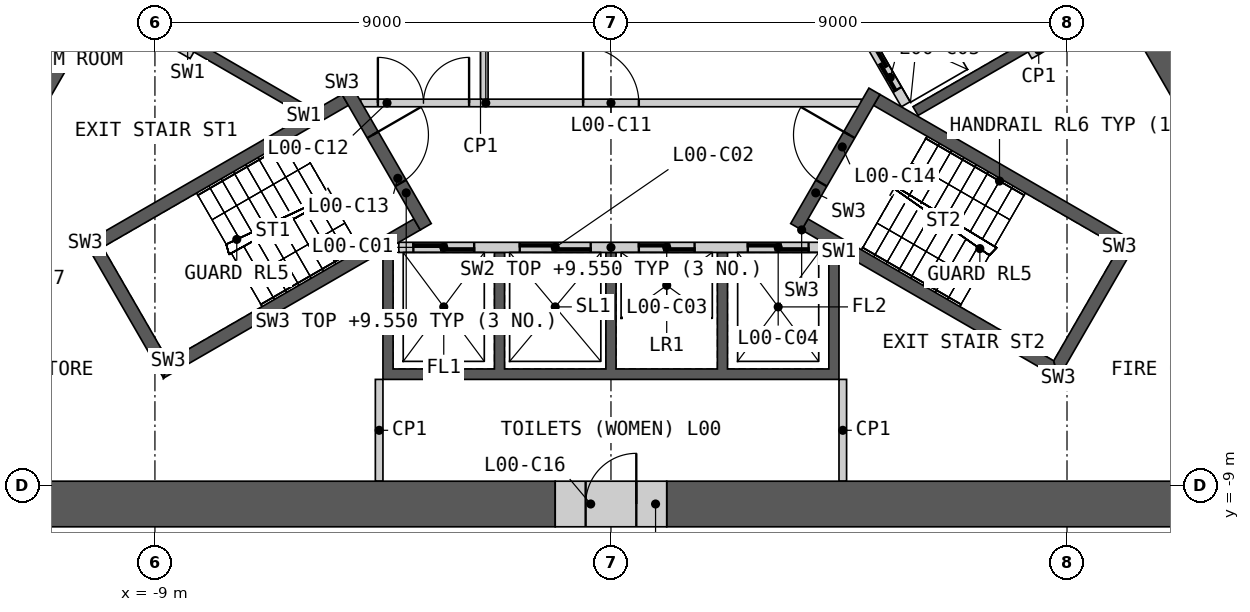
"""IFC4 building model, lengths in metres.
Left out: names, types, materials, properties, quantities, classifications, styles, units other than length and angle.
Written with IfcOpenShell. Run it as: python <this file> out.ifc"""

import sys

from ifc_helpers import new_model, si_unit, direction, frame, frame_2d, origin, place, context, subcontext, project, spatial, polyline, rectangle, outline, extrude, element, fill, save


model = new_model("IFC4")
c1 = context("Model", 3, precision=1e-05, world=origin(), true_north=direction((0.0, 1.0)))
c2 = subcontext(c1, "Body", "Model", "MODEL_VIEW")
j1 = project(units=[si_unit("LENGTHUNIT", "METRE"), si_unit("PLANEANGLEUNIT", "RADIAN")], contexts=[c1])
p1 = place(None, origin())
s1 = spatial("IfcSite", under=j1, at=p1, CompositionType="ELEMENT")
p2 = place(p1, origin())
s2 = spatial("IfcBuilding", under=s1, at=p2, CompositionType="ELEMENT")
p3 = place(p2, origin())
s3 = spatial("IfcBuildingStorey", under=s2, at=p3, CompositionType="ELEMENT", Elevation=0.0)
p4 = place(p3, origin())
e1 = element("IfcWall", 1, at=p4, inside=s3, PredefinedType="SHEAR", context=c2, shape_type="SweptSolid", body=[
    extrude(outline(polyline([(4.5, -4.4), (4.5, -6.906), (-4.5, -6.906), (-4.5, -4.4), (-4.3, -4.4), (-4.3, -6.7), (-2.3, -6.7), (-2.3, -4.4), (-2.1, -4.4), (-2.1, -6.7), (-0.1, -6.7), (-0.1, -4.4), (0.1, -4.4), (0.1, -6.7), (2.1, -6.7), (2.1, -4.4), (2.3, -4.4), (2.3, -6.7), (4.3, -6.7), (4.3, -4.4), (4.5, -4.4)])), origin(), (0.0, 0.0, 1.0), 9.55),
])
p5 = place(p3, frame((-4.187, -4.3, 0.0), z_axis=(0.0, 0.0, 1.0), x_axis=(1.0, 0.0, 0.0)))
e2 = element("IfcWall", 2, at=p5, inside=s3, PredefinedType="SOLIDWALL", context=c2, shape_type="SweptSolid", body=[
    extrude(rectangle(XDim=8.373, YDim=0.2, at=frame_2d((4.187, 0.0))), origin(), (0.0, 0.0, 1.0), 9.55),
])
p6 = place(p5, frame((0.287, 0.0, 0.0)))
e3 = element("IfcOpeningElement", 3, at=p6, cuts=e2, PredefinedType="OPENING", context=c2, shape_type="SweptSolid", body=[
    extrude(rectangle(XDim=1.2, YDim=2.1, at=frame_2d((0.6, 1.05))), frame((0.0, 0.11, 0.0), z_axis=(0.0, -1.0, 0.0), x_axis=(1.0, 0.0, 0.0)), (0.0, 0.0, 1.0), 0.22),
])
p7 = place(p5, frame((2.387, 0.0, 0.0)))
e4 = element("IfcOpeningElement", 4, at=p7, cuts=e2, PredefinedType="OPENING", context=c2, shape_type="SweptSolid", body=[
    extrude(rectangle(XDim=1.4, YDim=2.1, at=frame_2d((0.7, 1.05))), frame((0.0, 0.11, 0.0), z_axis=(0.0, -1.0, 0.0), x_axis=(1.0, 0.0, 0.0)), (0.0, 0.0, 1.0), 0.22),
])
p8 = place(p5, frame((4.737, 0.0, 0.0)))
e5 = element("IfcOpeningElement", 5, at=p8, cuts=e2, PredefinedType="OPENING", context=c2, shape_type="SweptSolid", body=[
    extrude(rectangle(XDim=1.1, YDim=2.1, at=frame_2d((0.55, 1.05))), frame((0.0, 0.11, 0.0), z_axis=(0.0, -1.0, 0.0), x_axis=(1.0, 0.0, 0.0)), (0.0, 0.0, 1.0), 0.22),
])
p9 = place(p5, frame((6.887, 0.0, 0.0)))
e6 = element("IfcOpeningElement", 6, at=p9, cuts=e2, PredefinedType="OPENING", context=c2, shape_type="SweptSolid", body=[
    extrude(rectangle(XDim=1.2, YDim=2.1, at=frame_2d((0.6, 1.05))), frame((0.0, 0.11, 0.0), z_axis=(0.0, -1.0, 0.0), x_axis=(1.0, 0.0, 0.0)), (0.0, 0.0, 1.0), 0.22),
])
p10 = place(p3, origin())
e7 = element("IfcWall", 7, at=p10, inside=s3, PredefinedType="SHEAR", context=c2, shape_type="SweptSolid", body=[
    extrude(outline(polyline([(2.66, 4.192), (4.831, 5.445), (8.231, -0.444), (6.061, -1.697), (5.96, -1.524), (7.952, -0.374), (6.952, 1.358), (4.96, 0.208), (4.861, 0.381), (6.852, 1.531), (5.852, 3.263), (3.861, 2.113), (3.76, 2.287), (5.752, 3.437), (4.752, 5.169), (2.76, 4.019), (2.66, 4.192)])), origin(), (0.0, 0.0, 1.0), 9.55),
])
p11 = place(p3, frame((5.817, -1.476, 0.0), z_axis=(0.0, 0.0, 1.0), x_axis=(-0.499992876559, 0.866029516466, 0.0)))
e8 = element("IfcWall", 8, at=p11, inside=s3, PredefinedType="SOLIDWALL", context=c2, shape_type="SweptSolid", body=[
    extrude(rectangle(XDim=6.486, YDim=0.2, at=frame_2d((3.243, 0.0))), origin(), (0.0, 0.0, 1.0), 9.55),
])
p12 = place(p11, frame((0.337, 0.0, 0.0)))
e9 = element("IfcOpeningElement", 9, at=p12, cuts=e8, PredefinedType="OPENING", context=c2, shape_type="SweptSolid", body=[
    extrude(rectangle(XDim=1.1, YDim=2.1, at=frame_2d((0.55, 1.05))), frame((0.0, 0.11, 0.0), z_axis=(0.0, -1.0, 0.0), x_axis=(1.0, 0.0, 0.0)), (0.0, 0.0, 1.0), 0.22),
])
p13 = place(p11, frame((2.537, 0.0, 0.0)))
e10 = element("IfcOpeningElement", 10, at=p13, cuts=e8, PredefinedType="OPENING", context=c2, shape_type="SweptSolid", body=[
    extrude(rectangle(XDim=1.1, YDim=2.1, at=frame_2d((0.55, 1.05))), frame((0.0, 0.11, 0.0), z_axis=(0.0, -1.0, 0.0), x_axis=(1.0, 0.0, 0.0)), (0.0, 0.0, 1.0), 0.22),
])
p14 = place(p11, frame((4.737, 0.0, 0.0)))
e11 = element("IfcOpeningElement", 11, at=p14, cuts=e8, PredefinedType="OPENING", context=c2, shape_type="SweptSolid", body=[
    extrude(rectangle(XDim=1.1, YDim=2.1, at=frame_2d((0.55, 1.05))), frame((0.0, 0.11, 0.0), z_axis=(0.0, -1.0, 0.0), x_axis=(1.0, 0.0, 0.0)), (0.0, 0.0, 1.0), 0.22),
])
p15 = place(p3, origin())
e12 = element("IfcWall", 12, at=p15, inside=s3, PredefinedType="SHEAR", context=c2, shape_type="SweptSolid", body=[
    extrude(outline(polyline([(-6.061, -1.697), (-8.231, -0.444), (-8.131, -0.271), (-5.96, -1.524), (-6.061, -1.697)])), origin(), (0.0, 0.0, 1.0), 9.55),
])
p16 = place(p3, frame((-4.941, -1.45, 0.0), z_axis=(0.0, 0.0, 1.0), x_axis=(1.0, 0.0, 0.0)))
e13 = element("IfcWall", 13, at=p16, inside=s3, PredefinedType="PARTITIONING", context=c2, shape_type="SweptSolid", body=[
    extrude(rectangle(XDim=9.882, YDim=0.15, at=frame_2d((4.941, 0.0))), origin(), (0.0, 0.0, 1.0), 9.55),
])
p17 = place(p16, frame((4.391, 0.0, 0.0)))
e14 = element("IfcOpeningElement", 14, at=p17, cuts=e13, PredefinedType="OPENING", context=c2, shape_type="SweptSolid", body=[
    extrude(rectangle(XDim=1.1, YDim=2.1, at=frame_2d((0.55, 1.05))), frame((0.0, 0.085, 0.0), z_axis=(0.0, -1.0, 0.0), x_axis=(1.0, 0.0, 0.0)), (0.0, 0.0, 1.0), 0.17),
])
p18 = place(p16, frame((0.341, 0.0, 0.0)))
e15 = element("IfcOpeningElement", 15, at=p18, cuts=e13, PredefinedType="OPENING", context=c2, shape_type="SweptSolid", body=[
    extrude(rectangle(XDim=1.8, YDim=2.1, at=frame_2d((0.9, 1.05))), frame((0.0, 0.085, 0.0), z_axis=(0.0, -1.0, 0.0), x_axis=(1.0, 0.0, 0.0)), (0.0, 0.0, 1.0), 0.17),
])
p19 = place(p3, origin())
e16 = element("IfcWall", 16, at=p19, inside=s3, PredefinedType="PARTITIONING", context=c2, shape_type="SweptSolid", body=[
    extrude(outline(polyline([(-2.575, 0.235), (-2.425, 0.235), (-2.425, -1.375), (-2.575, -1.375), (-2.575, 0.235)])), origin(), (0.0, 0.0, 1.0), 9.55),
])
p20 = place(p3, origin())
e17 = element("IfcWall", 17, at=p20, inside=s3, PredefinedType="SHEAR", context=c2, shape_type="SweptSolid", body=[
    extrude(outline(polyline([(-5.307, -1.281), (-10.374, -4.206), (-10.032, -4.298), (-5.182, -1.498), (-5.307, -1.281)])), origin(), (0.0, 0.0, 1.0), 9.55),
])
p21 = place(p3, origin())
e18 = element("IfcWall", 18, at=p21, inside=s3, PredefinedType="SHEAR", context=c2, shape_type="SweptSolid", body=[
    extrude(outline(polyline([(-10.374, -4.206), (-8.83, -6.881), (-8.738, -6.539), (-10.032, -4.298), (-10.374, -4.206)])), origin(), (0.0, 0.0, 1.0), 9.55),
])
p22 = place(p3, origin())
e19 = element("IfcWall", 19, at=p22, inside=s3, PredefinedType="SHEAR", context=c2, shape_type="SweptSolid", body=[
    extrude(outline(polyline([(-8.738, -6.539), (-8.83, -6.881), (-3.763, -3.956), (-3.888, -3.739), (-8.738, -6.539)])), origin(), (0.0, 0.0, 1.0), 9.55),
])
p23 = place(p3, frame((-5.199, -1.219, 0.0), z_axis=(0.0, 0.0, 1.0), x_axis=(0.499982516597, -0.866035497597, 0.0)))
e20 = element("IfcWall", 20, at=p23, inside=s3, PredefinedType="SHEAR", context=c2, shape_type="SweptSolid", body=[
    extrude(rectangle(XDim=3.088, YDim=0.25, at=frame_2d((1.544, 0.0))), origin(), (0.0, 0.0, 1.0), 9.55),
])
p24 = place(p23, frame((0.994, 0.0, 0.0)))
e21 = element("IfcOpeningElement", 21, at=p24, cuts=e20, PredefinedType="OPENING", context=c2, shape_type="SweptSolid", body=[
    extrude(rectangle(XDim=1.1, YDim=2.1, at=frame_2d((0.55, 1.05))), frame((0.0, 0.135, 0.0), z_axis=(0.0, -1.0, 0.0), x_axis=(1.0, 0.0, 0.0)), (0.0, 0.0, 1.0), 0.27),
])
p25 = place(p3, origin())
e22 = element("IfcWall", 22, at=p25, inside=s3, PredefinedType="SHEAR", context=c2, shape_type="SweptSolid", body=[
    extrude(outline(polyline([(3.763, -3.956), (8.83, -6.881), (8.738, -6.539), (3.888, -3.739), (3.763, -3.956)])), origin(), (0.0, 0.0, 1.0), 9.55),
])
p26 = place(p3, origin())
e23 = element("IfcWall", 23, at=p26, inside=s3, PredefinedType="SHEAR", context=c2, shape_type="SweptSolid", body=[
    extrude(outline(polyline([(8.83, -6.881), (10.374, -4.206), (10.032, -4.298), (8.738, -6.539), (8.83, -6.881)])), origin(), (0.0, 0.0, 1.0), 9.55),
])
p27 = place(p3, origin())
e24 = element("IfcWall", 24, at=p27, inside=s3, PredefinedType="SHEAR", context=c2, shape_type="SweptSolid", body=[
    extrude(outline(polyline([(10.032, -4.298), (10.374, -4.206), (5.307, -1.281), (5.182, -1.498), (10.032, -4.298)])), origin(), (0.0, 0.0, 1.0), 9.55),
])
p28 = place(p3, frame((3.655, -3.893, 0.0), z_axis=(0.0, 0.0, 1.0), x_axis=(0.499982516597, 0.866035497597, 0.0)))
e25 = element("IfcWall", 25, at=p28, inside=s3, PredefinedType="SHEAR", context=c2, shape_type="SweptSolid", body=[
    extrude(rectangle(XDim=3.088, YDim=0.25, at=frame_2d((1.544, 0.0))), origin(), (0.0, 0.0, 1.0), 9.55),
])
p29 = place(p28, frame((0.994, 0.0, 0.0)))
e26 = element("IfcOpeningElement", 26, at=p29, cuts=e25, PredefinedType="OPENING", context=c2, shape_type="SweptSolid", body=[
    extrude(rectangle(XDim=1.1, YDim=2.1, at=frame_2d((0.55, 1.05))), frame((0.0, 0.135, 0.0), z_axis=(0.0, -1.0, 0.0), x_axis=(1.0, 0.0, 0.0)), (0.0, 0.0, 1.0), 0.27),
])
for number, where, z_axis, x_axis in (
    (27, (4.575, -6.906, 0.0), (0.0, 0.0, 1.0), (0.0, -1.0, 0.0)),
    (28, (-4.575, -6.906, 0.0), (0.0, 0.0, 1.0), (0.0, -1.0, 0.0)),
):
    element("IfcWall", number, at=place(p3, frame(where, z_axis=z_axis, x_axis=x_axis)), inside=s3, PredefinedType="PARTITIONING", context=c2, shape_type="SweptSolid", body=[
        extrude(rectangle(XDim=2.009, YDim=0.15, at=frame_2d((1.004, 0.0))), origin(), (0.0, 0.0, 1.0), 9.55),
    ])
for number, where, z_axis, x_axis in (
    (29, (8.268, -0.509, 0.0), (0.0, 0.0, 1.0), (0.866, 0.5, 0.0)),
    (30, (-8.268, -0.509, 0.0), (0.0, 0.0, 1.0), (-0.866, 0.5, 0.0)),
):
    element("IfcWall", number, at=place(p3, frame(where, z_axis=z_axis, x_axis=x_axis)), inside=s3, PredefinedType="PARTITIONING", context=c2, shape_type="SweptSolid", body=[
        extrude(rectangle(XDim=2.009, YDim=0.15, at=frame_2d((1.004, 0.0))), origin(), (0.0, 0.0, 1.0), 9.55),
    ])
for number, where, z_axis, x_axis in (
    (31, (1.1, -9.365, 0.0), (0.0, 0.0, 1.0), (1.0, 0.0, 0.0)),
    (32, (-15.441, -9.365, 0.0), (0.0, 0.0, 1.0), (1.0, 0.0, 0.0)),
):
    element("IfcWall", number, at=place(p3, frame(where, z_axis=z_axis, x_axis=x_axis)), inside=s3, PredefinedType="SHEAR", context=c2, shape_type="SweptSolid", body=[
        extrude(rectangle(XDim=14.341, YDim=0.9, at=frame_2d((7.17, 0.0))), origin(), (0.0, 0.0, 1.0), 9.55),
    ])
p30 = place(p3, frame((12.583, -3.065, 0.0), z_axis=(0.0, 0.0, 1.0), x_axis=(-0.49998745675, 0.866032645512, 0.0)))
e33 = element("IfcWall", 33, at=p30, inside=s3, PredefinedType="SHEAR", context=c2, shape_type="SweptSolid", body=[
    extrude(rectangle(XDim=6.646, YDim=0.9, at=frame_2d((3.323, 0.0))), origin(), (0.0, 0.0, 1.0), 9.55),
])
p31 = place(p3, frame((-10.26, 0.958, 0.0), z_axis=(0.0, 0.0, 1.0), x_axis=(-0.499993887256, -0.86602893295, 0.0)))
e34 = element("IfcWall", 34, at=p31, inside=s3, PredefinedType="SHEAR", context=c2, shape_type="SweptSolid", body=[
    extrude(rectangle(XDim=4.646, YDim=0.9, at=frame_2d((2.323, 0.0))), origin(), (0.0, 0.0, 1.0), 9.55),
])
p32 = place(p3, frame((-1.1, -9.365, 0.0), z_axis=(0.0, 0.0, 1.0), x_axis=(1.0, 0.0, 0.0)))
e35 = element("IfcWall", 35, at=p32, inside=s3, PredefinedType="SHEAR", context=c2, shape_type="SweptSolid", body=[
    extrude(rectangle(XDim=2.2, YDim=0.9, at=frame_2d((1.1, 0.0))), origin(), (0.0, 0.0, 1.0), 9.55),
])
p33 = place(p32, frame((0.6, 0.0, 0.0)))
e36 = element("IfcOpeningElement", 36, at=p33, cuts=e35, PredefinedType="OPENING", context=c2, shape_type="SweptSolid", body=[
    extrude(rectangle(XDim=1.0, YDim=2.1, at=frame_2d((0.5, 1.05))), frame((0.0, 0.46, 0.0), z_axis=(0.0, -1.0, 0.0), x_axis=(1.0, 0.0, 0.0)), (0.0, 0.0, 1.0), 0.92),
])
p34 = place(p3, frame((10.749, 5.813, 0.0), z_axis=(0.0, 0.0, 1.0), x_axis=(0.500004292778, -0.866022925334, 0.0)))
e37 = element("IfcWall", 37, at=p34, inside=s3, PredefinedType="PARTITIONING", context=c2, shape_type="SweptSolid", body=[
    extrude(rectangle(XDim=9.898, YDim=0.2, at=frame_2d((4.949, 0.0))), origin(), (0.0, 0.0, 1.0), 9.55),
])
p35 = place(p34, frame((3.898, 0.0, 0.0)))
e38 = element("IfcOpeningElement", 38, at=p35, cuts=e37, PredefinedType="OPENING", context=c2, shape_type="SweptSolid", body=[
    extrude(rectangle(XDim=2.0, YDim=2.1, at=frame_2d((1.0, 1.05))), frame((0.0, 0.11, 0.0), z_axis=(0.0, -1.0, 0.0), x_axis=(1.0, 0.0, 0.0)), (0.0, 0.0, 1.0), 0.22),
])
p36 = place(p6, origin())
e39 = element("IfcDoor", 39, at=p36, inside=s3, OperationType="SLIDING_TO_LEFT", PredefinedType="DOOR", context=c2, shape_type="SweptSolid", body=[
    extrude(rectangle(XDim=1.2, YDim=2.1, at=frame_2d((0.6, 1.05))), frame((0.0, 0.025, 0.0), z_axis=(0.0, -1.0, 0.0), x_axis=(1.0, 0.0, 0.0)), (0.0, 0.0, 1.0), 0.05),
])
fill(e3, e39)
p37 = place(p7, origin())
e40 = element("IfcDoor", 40, at=p37, inside=s3, OperationType="SLIDING_TO_LEFT", PredefinedType="DOOR", context=c2, shape_type="SweptSolid", body=[
    extrude(rectangle(XDim=1.4, YDim=2.1, at=frame_2d((0.7, 1.05))), frame((0.0, 0.025, 0.0), z_axis=(0.0, -1.0, 0.0), x_axis=(1.0, 0.0, 0.0)), (0.0, 0.0, 1.0), 0.05),
])
fill(e4, e40)
p38 = place(p8, origin())
e41 = element("IfcDoor", 41, at=p38, inside=s3, OperationType="SLIDING_TO_LEFT", PredefinedType="DOOR", context=c2, shape_type="SweptSolid", body=[
    extrude(rectangle(XDim=1.1, YDim=2.1, at=frame_2d((0.55, 1.05))), frame((0.0, 0.025, 0.0), z_axis=(0.0, -1.0, 0.0), x_axis=(1.0, 0.0, 0.0)), (0.0, 0.0, 1.0), 0.05),
])
fill(e5, e41)
p39 = place(p9, origin())
e42 = element("IfcDoor", 42, at=p39, inside=s3, OperationType="SLIDING_TO_LEFT", PredefinedType="DOOR", context=c2, shape_type="SweptSolid", body=[
    extrude(rectangle(XDim=1.2, YDim=2.1, at=frame_2d((0.6, 1.05))), frame((0.0, 0.025, 0.0), z_axis=(0.0, -1.0, 0.0), x_axis=(1.0, 0.0, 0.0)), (0.0, 0.0, 1.0), 0.05),
])
fill(e6, e42)
p40 = place(p12, origin())
e43 = element("IfcDoor", 43, at=p40, inside=s3, OperationType="SLIDING_TO_LEFT", PredefinedType="DOOR", context=c2, shape_type="SweptSolid", body=[
    extrude(rectangle(XDim=1.1, YDim=2.1, at=frame_2d((0.55, 1.05))), frame((0.0, 0.025, 0.0), z_axis=(0.0, -1.0, 0.0), x_axis=(1.0, 0.0, 0.0)), (0.0, 0.0, 1.0), 0.05),
])
fill(e9, e43)
p41 = place(p17, origin())
e44 = element("IfcDoor", 44, at=p41, inside=s3, OperationType="SINGLE_SWING_LEFT", PredefinedType="DOOR", context=c2, shape_type="SweptSolid", body=[
    extrude(rectangle(XDim=1.1, YDim=2.1, at=frame_2d((0.55, 1.05))), frame((0.0, 0.025, 0.0), z_axis=(0.0, -1.0, 0.0), x_axis=(1.0, 0.0, 0.0)), (0.0, 0.0, 1.0), 0.05),
])
fill(e14, e44)
p42 = place(p18, origin())
e45 = element("IfcDoor", 45, at=p42, inside=s3, OperationType="DOUBLE_DOOR_SINGLE_SWING", PredefinedType="DOOR", context=c2, shape_type="SweptSolid", body=[
    extrude(rectangle(XDim=1.8, YDim=2.1, at=frame_2d((0.9, 1.05))), frame((0.0, 0.025, 0.0), z_axis=(0.0, -1.0, 0.0), x_axis=(1.0, 0.0, 0.0)), (0.0, 0.0, 1.0), 0.05),
])
fill(e15, e45)
p43 = place(p24, origin())
e46 = element("IfcDoor", 46, at=p43, inside=s3, OperationType="SINGLE_SWING_LEFT", PredefinedType="DOOR", context=c2, shape_type="SweptSolid", body=[
    extrude(rectangle(XDim=1.1, YDim=2.1, at=frame_2d((0.55, 1.05))), frame((0.0, 0.025, 0.0), z_axis=(0.0, -1.0, 0.0), x_axis=(1.0, 0.0, 0.0)), (0.0, 0.0, 1.0), 0.05),
])
fill(e21, e46)
p44 = place(p29, origin())
e47 = element("IfcDoor", 47, at=p44, inside=s3, OperationType="SINGLE_SWING_RIGHT", PredefinedType="DOOR", context=c2, shape_type="SweptSolid", body=[
    extrude(rectangle(XDim=1.1, YDim=2.1, at=frame_2d((0.55, 1.05))), frame((0.0, 0.025, 0.0), z_axis=(0.0, -1.0, 0.0), x_axis=(1.0, 0.0, 0.0)), (0.0, 0.0, 1.0), 0.05),
])
fill(e26, e47)
p45 = place(p33, origin())
e48 = element("IfcDoor", 48, at=p45, inside=s3, OperationType="SINGLE_SWING_RIGHT", PredefinedType="DOOR", context=c2, shape_type="SweptSolid", body=[
    extrude(rectangle(XDim=1.0, YDim=2.1, at=frame_2d((0.5, 1.05))), frame((0.0, 0.205, 0.0), z_axis=(0.0, -1.0, 0.0), x_axis=(1.0, 0.0, 0.0)), (0.0, 0.0, 1.0), 0.05),
])
fill(e36, e48)
save(model, sys.argv[1])
